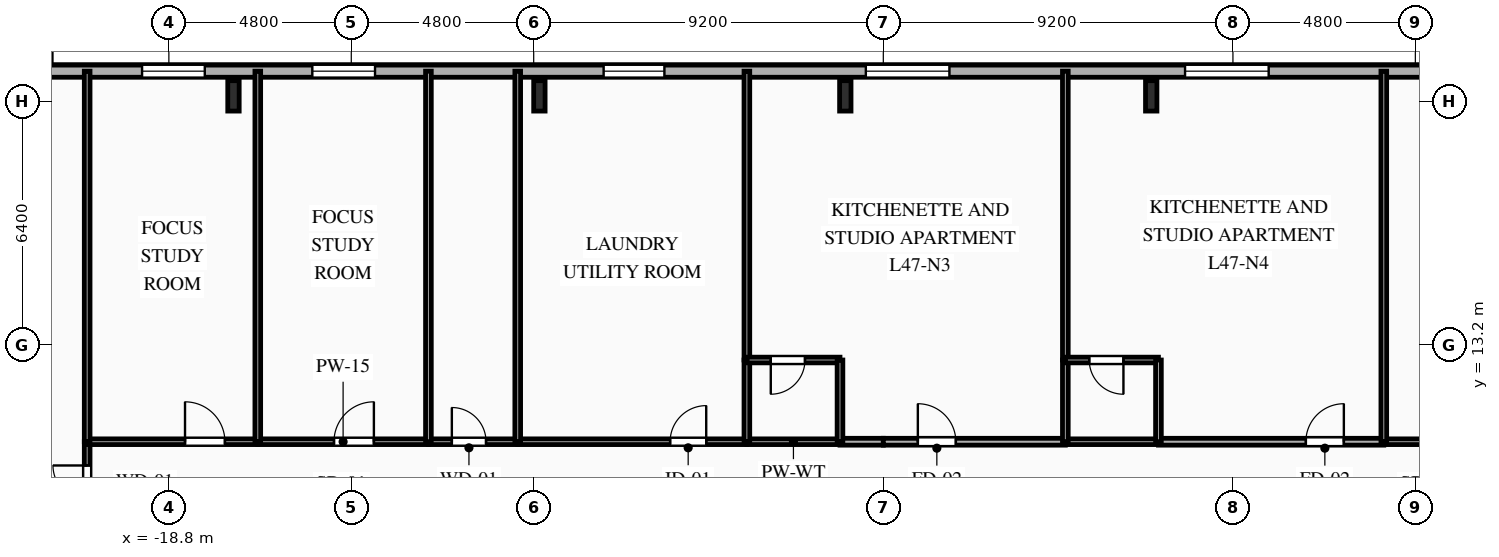
"""IFC4 building model, lengths in metres.
Left out: names, types, materials, properties, quantities, classifications, styles, units other than length and angle.
Written with IfcOpenShell. Run it as: python <this file> out.ifc"""

import sys

from ifc_helpers import new_model, si_unit, direction, frame, frame_2d, origin, origin_2d, place, context, subcontext, project, spatial, rectangle, i_section, extrude, element, fill, save


model = new_model("IFC4")
c1 = context("Model", 3, precision=1e-05, world=origin(), true_north=direction((0.0, 1.0)))
c2 = subcontext(c1, "Body", "Model", "MODEL_VIEW")
j1 = project(units=[si_unit("LENGTHUNIT", "METRE"), si_unit("PLANEANGLEUNIT", "RADIAN")], contexts=[c1])
p1 = place(None, origin())
s1 = spatial("IfcSite", under=j1, at=p1, CompositionType="ELEMENT")
p2 = place(p1, origin())
s2 = spatial("IfcBuilding", under=s1, at=p2, CompositionType="ELEMENT")
p3 = place(p2, frame((0.0, 0.0, 167.85)))
s3 = spatial("IfcBuildingStorey", under=s2, at=p3, CompositionType="ELEMENT", Elevation=167.85)
for number, where, z_axis, x_axis in (
    (1, (7.05, 19.75, 0.0), (0.0, 0.0, 1.0), (1.0, 0.0, 0.0)),
    (2, (-1.0, 19.75, 0.0), (0.0, 0.0, 1.0), (1.0, 0.0, 0.0)),
    (3, (-9.05, 19.75, 0.0), (0.0, 0.0, 1.0), (1.0, 0.0, 0.0)),
    (4, (-17.1, 19.75, 0.0), (0.0, 0.0, 1.0), (1.0, 0.0, 0.0)),
):
    element("IfcColumn", number, at=place(p3, frame(where, z_axis=z_axis, x_axis=x_axis)), inside=s3, PredefinedType="COLUMN", context=c2, shape_type="SweptSolid", body=[
        extrude(i_section(OverallWidth=0.3, OverallDepth=0.8, WebThickness=0.018, FlangeThickness=0.033, FilletRadius=0.03, at=origin_2d()), origin(), (0.0, 0.0, 1.0), 3.35),
    ])
p4 = place(p3, frame((-25.8, 20.4, 0.0), z_axis=(0.0, 0.0, 1.0), x_axis=(1.0, 0.0, 0.0)))
e5 = element("IfcWall", 5, at=p4, inside=s3, PredefinedType="SOLIDWALL", context=c2, shape_type="SweptSolid", body=[
    extrude(rectangle(XDim=49.6, YDim=0.32, at=frame_2d((24.8, 0.0))), origin(), (0.0, 0.0, 1.0), 3.04),
])
p5 = place(p4, frame((2.135, 0.0, 0.85)))
e6 = element("IfcOpeningElement", 6, at=p5, cuts=e5, PredefinedType="OPENING", context=c2, shape_type="SweptSolid", body=[
    extrude(rectangle(XDim=1.65, YDim=1.85, at=frame_2d((0.825, 0.925))), frame((0.0, 0.17, 0.0), z_axis=(0.0, -1.0, 0.0), x_axis=(1.0, 0.0, 0.0)), (0.0, 0.0, 1.0), 0.34),
])
p6 = place(p4, frame((6.295, 0.0, 0.85)))
e7 = element("IfcOpeningElement", 7, at=p6, cuts=e5, PredefinedType="OPENING", context=c2, shape_type="SweptSolid", body=[
    extrude(rectangle(XDim=1.65, YDim=1.85, at=frame_2d((0.825, 0.925))), frame((0.0, 0.17, 0.0), z_axis=(0.0, -1.0, 0.0), x_axis=(1.0, 0.0, 0.0)), (0.0, 0.0, 1.0), 0.34),
])
p7 = place(p4, frame((10.775, 0.0, 0.85)))
e8 = element("IfcOpeningElement", 8, at=p7, cuts=e5, PredefinedType="OPENING", context=c2, shape_type="SweptSolid", body=[
    extrude(rectangle(XDim=1.65, YDim=1.85, at=frame_2d((0.825, 0.925))), frame((0.0, 0.17, 0.0), z_axis=(0.0, -1.0, 0.0), x_axis=(1.0, 0.0, 0.0)), (0.0, 0.0, 1.0), 0.34),
])
p8 = place(p4, frame((18.44, 0.0, 0.85)))
e9 = element("IfcOpeningElement", 9, at=p8, cuts=e5, PredefinedType="OPENING", context=c2, shape_type="SweptSolid", body=[
    extrude(rectangle(XDim=1.6, YDim=1.85, at=frame_2d((0.8, 0.925))), frame((0.0, 0.17, 0.0), z_axis=(0.0, -1.0, 0.0), x_axis=(1.0, 0.0, 0.0)), (0.0, 0.0, 1.0), 0.34),
])
p9 = place(p4, frame((25.34, 0.0, 0.85)))
e10 = element("IfcOpeningElement", 10, at=p9, cuts=e5, PredefinedType="OPENING", context=c2, shape_type="SweptSolid", body=[
    extrude(rectangle(XDim=2.2, YDim=1.85, at=frame_2d((1.1, 0.925))), frame((0.0, 0.17, 0.0), z_axis=(0.0, -1.0, 0.0), x_axis=(1.0, 0.0, 0.0)), (0.0, 0.0, 1.0), 0.34),
])
p10 = place(p4, frame((33.74, 0.0, 0.85)))
e11 = element("IfcOpeningElement", 11, at=p10, cuts=e5, PredefinedType="OPENING", context=c2, shape_type="SweptSolid", body=[
    extrude(rectangle(XDim=2.2, YDim=1.85, at=frame_2d((1.1, 0.925))), frame((0.0, 0.17, 0.0), z_axis=(0.0, -1.0, 0.0), x_axis=(1.0, 0.0, 0.0)), (0.0, 0.0, 1.0), 0.34),
])
p11 = place(p4, frame((42.095, 0.0, 0.85)))
e12 = element("IfcOpeningElement", 12, at=p11, cuts=e5, PredefinedType="OPENING", context=c2, shape_type="SweptSolid", body=[
    extrude(rectangle(XDim=1.65, YDim=1.85, at=frame_2d((0.825, 0.925))), frame((0.0, 0.17, 0.0), z_axis=(0.0, -1.0, 0.0), x_axis=(1.0, 0.0, 0.0)), (0.0, 0.0, 1.0), 0.34),
])
p12 = place(p4, frame((47.45, 0.0, 0.85)))
e13 = element("IfcOpeningElement", 13, at=p12, cuts=e5, PredefinedType="OPENING", context=c2, shape_type="SweptSolid", body=[
    extrude(rectangle(XDim=1.1, YDim=1.85, at=frame_2d((0.55, 0.925))), frame((0.0, 0.17, 0.0), z_axis=(0.0, -1.0, 0.0), x_axis=(1.0, 0.0, 0.0)), (0.0, 0.0, 1.0), 0.34),
])
p13 = place(p3, frame((-20.95, 8.5, 0.0), z_axis=(0.0, 0.0, 1.0), x_axis=(0.0, 1.0, 0.0)))
e14 = element("IfcWall", 14, at=p13, inside=s3, PredefinedType="PARTITIONING", context=c2, shape_type="SweptSolid", body=[
    extrude(rectangle(XDim=2.15, YDim=0.15, at=frame_2d((1.075, 0.0))), origin(), (0.0, 0.0, 1.0), 3.04),
])
p14 = place(p13, frame((0.625, 0.0, 0.0)))
e15 = element("IfcOpeningElement", 15, at=p14, cuts=e14, PredefinedType="OPENING", context=c2, shape_type="SweptSolid", body=[
    extrude(rectangle(XDim=0.9, YDim=2.1, at=frame_2d((0.45, 1.05))), frame((0.0, 0.085, 0.0), z_axis=(0.0, -1.0, 0.0), x_axis=(1.0, 0.0, 0.0)), (0.0, 0.0, 1.0), 0.17),
])
p15 = place(p3, frame((-20.95, 10.65, 0.0), z_axis=(0.0, 0.0, 1.0), x_axis=(1.0, 0.0, 0.0)))
e16 = element("IfcWall", 16, at=p15, inside=s3, PredefinedType="PARTITIONING", context=c2, shape_type="SweptSolid", body=[
    extrude(rectangle(XDim=4.49, YDim=0.15, at=frame_2d((2.245, 0.0))), origin(), (0.0, 0.0, 1.0), 3.04),
])
p16 = place(p15, frame((2.575, 0.0, 0.0)))
e17 = element("IfcOpeningElement", 17, at=p16, cuts=e16, PredefinedType="OPENING", context=c2, shape_type="SweptSolid", body=[
    extrude(rectangle(XDim=1.05, YDim=2.15, at=frame_2d((0.525, 1.075))), frame((0.0, 0.085, 0.0), z_axis=(0.0, -1.0, 0.0), x_axis=(1.0, 0.0, 0.0)), (0.0, 0.0, 1.0), 0.17),
])
p17 = place(p3, frame((-16.46, 10.65, 0.0), z_axis=(0.0, 0.0, 1.0), x_axis=(1.0, 0.0, 0.0)))
e18 = element("IfcWall", 18, at=p17, inside=s3, PredefinedType="PARTITIONING", context=c2, shape_type="SweptSolid", body=[
    extrude(rectangle(XDim=4.49, YDim=0.15, at=frame_2d((2.245, 0.0))), origin(), (0.0, 0.0, 1.0), 3.04),
])
p18 = place(p17, frame((2.005, 0.0, 0.0)))
e19 = element("IfcOpeningElement", 19, at=p18, cuts=e18, PredefinedType="OPENING", context=c2, shape_type="SweptSolid", body=[
    extrude(rectangle(XDim=1.05, YDim=2.15, at=frame_2d((0.525, 1.075))), frame((0.0, 0.085, 0.0), z_axis=(0.0, -1.0, 0.0), x_axis=(1.0, 0.0, 0.0)), (0.0, 0.0, 1.0), 0.17),
])
p19 = place(p3, frame((-11.97, 10.65, 0.0), z_axis=(0.0, 0.0, 1.0), x_axis=(1.0, 0.0, 0.0)))
e20 = element("IfcWall", 20, at=p19, inside=s3, PredefinedType="PLUMBINGWALL", context=c2, shape_type="SweptSolid", body=[
    extrude(rectangle(XDim=2.35, YDim=0.15, at=frame_2d((1.175, 0.0))), origin(), (0.0, 0.0, 1.0), 3.04),
])
p20 = place(p19, frame((0.616, 0.0, 0.0)))
e21 = element("IfcOpeningElement", 21, at=p20, cuts=e20, PredefinedType="OPENING", context=c2, shape_type="SweptSolid", body=[
    extrude(rectangle(XDim=0.9, YDim=2.1, at=frame_2d((0.45, 1.05))), frame((0.0, 0.085, 0.0), z_axis=(0.0, -1.0, 0.0), x_axis=(1.0, 0.0, 0.0)), (0.0, 0.0, 1.0), 0.17),
])
p21 = place(p3, frame((-9.62, 10.65, 0.0), z_axis=(0.0, 0.0, 1.0), x_axis=(1.0, 0.0, 0.0)))
e22 = element("IfcWall", 22, at=p21, inside=s3, PredefinedType="PARTITIONING", context=c2, shape_type="SweptSolid", body=[
    extrude(rectangle(XDim=6.03, YDim=0.15, at=frame_2d((3.015, 0.0))), origin(), (0.0, 0.0, 1.0), 3.04),
])
p22 = place(p21, frame((4.01, 0.0, 0.0)))
e23 = element("IfcOpeningElement", 23, at=p22, cuts=e22, PredefinedType="OPENING", context=c2, shape_type="SweptSolid", body=[
    extrude(rectangle(XDim=0.95, YDim=2.1, at=frame_2d((0.475, 1.05))), frame((0.0, 0.085, 0.0), z_axis=(0.0, -1.0, 0.0), x_axis=(1.0, 0.0, 0.0)), (0.0, 0.0, 1.0), 0.17),
])
p23 = place(p3, frame((-1.14, 10.65, 0.0), z_axis=(0.0, 0.0, 1.0), x_axis=(1.0, 0.0, 0.0)))
e24 = element("IfcWall", 24, at=p23, inside=s3, PredefinedType="PARTITIONING", context=c2, shape_type="SweptSolid", body=[
    extrude(rectangle(XDim=1.14, YDim=0.18, at=frame_2d((0.57, 0.0))), origin(), (0.0, 0.0, 1.0), 3.04),
])
p24 = place(p3, frame((-3.59, 10.65, 0.0), z_axis=(0.0, 0.0, 1.0), x_axis=(1.0, 0.0, 0.0)))
e25 = element("IfcWall", 25, at=p24, inside=s3, PredefinedType="PLUMBINGWALL", context=c2, shape_type="SweptSolid", body=[
    extrude(rectangle(XDim=2.45, YDim=0.15, at=frame_2d((1.225, 0.0))), origin(), (0.0, 0.0, 1.0), 3.04),
])
p25 = place(p3, frame((0.0, 10.65, 0.0), z_axis=(0.0, 0.0, 1.0), x_axis=(1.0, 0.0, 0.0)))
e26 = element("IfcWall", 26, at=p25, inside=s3, PredefinedType="PARTITIONING", context=c2, shape_type="SweptSolid", body=[
    extrude(rectangle(XDim=4.79, YDim=0.18, at=frame_2d((2.395, 0.0))), origin(), (0.0, 0.0, 1.0), 3.04),
])
p26 = place(p25, frame((0.909, 0.0, 0.0)))
e27 = element("IfcOpeningElement", 27, at=p26, cuts=e26, PredefinedType="OPENING", context=c2, shape_type="SweptSolid", body=[
    extrude(rectangle(XDim=1.0, YDim=2.15, at=frame_2d((0.5, 1.075))), frame((0.0, 0.1, 0.0), z_axis=(0.0, -1.0, 0.0), x_axis=(1.0, 0.0, 0.0)), (0.0, 0.0, 1.0), 0.2),
])
p27 = place(p3, frame((7.24, 10.65, 0.0), z_axis=(0.0, 0.0, 1.0), x_axis=(1.0, 0.0, 0.0)))
e28 = element("IfcWall", 28, at=p27, inside=s3, PredefinedType="PARTITIONING", context=c2, shape_type="SweptSolid", body=[
    extrude(rectangle(XDim=5.93, YDim=0.18, at=frame_2d((2.965, 0.0))), origin(), (0.0, 0.0, 1.0), 3.04),
])
p28 = place(p27, frame((3.879, 0.0, 0.0)))
e29 = element("IfcOpeningElement", 29, at=p28, cuts=e28, PredefinedType="OPENING", context=c2, shape_type="SweptSolid", body=[
    extrude(rectangle(XDim=1.0, YDim=2.15, at=frame_2d((0.5, 1.075))), frame((0.0, 0.1, 0.0), z_axis=(0.0, -1.0, 0.0), x_axis=(1.0, 0.0, 0.0)), (0.0, 0.0, 1.0), 0.2),
])
p29 = place(p3, frame((4.79, 10.65, 0.0), z_axis=(0.0, 0.0, 1.0), x_axis=(1.0, 0.0, 0.0)))
e30 = element("IfcWall", 30, at=p29, inside=s3, PredefinedType="PLUMBINGWALL", context=c2, shape_type="SweptSolid", body=[
    extrude(rectangle(XDim=2.45, YDim=0.15, at=frame_2d((1.225, 0.0))), origin(), (0.0, 0.0, 1.0), 3.04),
])
p30 = place(p3, frame((13.17, 10.65, 0.0), z_axis=(0.0, 0.0, 1.0), x_axis=(1.0, 0.0, 0.0)))
e31 = element("IfcWall", 31, at=p30, inside=s3, PredefinedType="PARTITIONING", context=c2, shape_type="SweptSolid", body=[
    extrude(rectangle(XDim=7.78, YDim=0.15, at=frame_2d((3.89, 0.0))), origin(), (0.0, 0.0, 1.0), 3.04),
])
p31 = place(p30, frame((1.276, 0.0, 0.0)))
e32 = element("IfcOpeningElement", 32, at=p31, cuts=e31, PredefinedType="OPENING", context=c2, shape_type="SweptSolid", body=[
    extrude(rectangle(XDim=1.05, YDim=2.15, at=frame_2d((0.525, 1.075))), frame((0.0, 0.085, 0.0), z_axis=(0.0, -1.0, 0.0), x_axis=(1.0, 0.0, 0.0)), (0.0, 0.0, 1.0), 0.17),
])
for number, where, z_axis, x_axis in (
    (33, (-20.95, 20.4, 0.0), (0.0, 0.0, 1.0), (0.0, -1.0, 0.0)),
    (34, (-16.46, 20.4, 0.0), (0.0, 0.0, 1.0), (0.0, -1.0, 0.0)),
):
    element("IfcWall", number, at=place(p3, frame(where, z_axis=z_axis, x_axis=x_axis)), inside=s3, PredefinedType="PARTITIONING", context=c2, shape_type="SweptSolid", body=[
        extrude(rectangle(XDim=9.75, YDim=0.15, at=frame_2d((4.875, 0.0))), origin(), (0.0, 0.0, 1.0), 3.04),
    ])
for number, where, z_axis, x_axis in (
    (35, (-11.97, 20.4, 0.0), (0.0, 0.0, 1.0), (0.0, -1.0, 0.0)),
    (36, (-9.62, 20.4, 0.0), (0.0, 0.0, 1.0), (0.0, -1.0, 0.0)),
):
    element("IfcWall", number, at=place(p3, frame(where, z_axis=z_axis, x_axis=x_axis)), inside=s3, PredefinedType="PLUMBINGWALL", context=c2, shape_type="SweptSolid", body=[
        extrude(rectangle(XDim=9.75, YDim=0.15, at=frame_2d((4.875, 0.0))), origin(), (0.0, 0.0, 1.0), 3.04),
    ])
p32 = place(p3, frame((-3.59, 20.4, 0.0), z_axis=(0.0, 0.0, 1.0), x_axis=(0.0, -1.0, 0.0)))
e37 = element("IfcWall", 37, at=p32, inside=s3, PredefinedType="PARTITIONING", context=c2, shape_type="SweptSolid", body=[
    extrude(rectangle(XDim=7.6, YDim=0.15, at=frame_2d((3.8, 0.0))), origin(), (0.0, 0.0, 1.0), 3.04),
])
p33 = place(p3, frame((-3.59, 12.8, 0.0), z_axis=(0.0, 0.0, 1.0), x_axis=(0.0, -1.0, 0.0)))
e38 = element("IfcWall", 38, at=p33, inside=s3, PredefinedType="PLUMBINGWALL", context=c2, shape_type="SweptSolid", body=[
    extrude(rectangle(XDim=2.15, YDim=0.15, at=frame_2d((1.075, 0.0))), origin(), (0.0, 0.0, 1.0), 3.04),
])
p34 = place(p3, frame((-1.14, 12.8, 0.0), z_axis=(0.0, 0.0, 1.0), x_axis=(-1.0, 0.0, 0.0)))
e39 = element("IfcWall", 39, at=p34, inside=s3, PredefinedType="PLUMBINGWALL", context=c2, shape_type="SweptSolid", body=[
    extrude(rectangle(XDim=2.45, YDim=0.15, at=frame_2d((1.225, 0.0))), origin(), (0.0, 0.0, 1.0), 3.04),
])
p35 = place(p34, frame((0.921, 0.0, 0.0)))
e40 = element("IfcOpeningElement", 40, at=p35, cuts=e39, PredefinedType="OPENING", context=c2, shape_type="SweptSolid", body=[
    extrude(rectangle(XDim=0.9, YDim=2.1, at=frame_2d((0.45, 1.05))), frame((0.0, 0.085, 0.0), z_axis=(0.0, -1.0, 0.0), x_axis=(1.0, 0.0, 0.0)), (0.0, 0.0, 1.0), 0.17),
])
p36 = place(p3, frame((-1.14, 10.65, 0.0), z_axis=(0.0, 0.0, 1.0), x_axis=(0.0, 1.0, 0.0)))
e41 = element("IfcWall", 41, at=p36, inside=s3, PredefinedType="PLUMBINGWALL", context=c2, shape_type="SweptSolid", body=[
    extrude(rectangle(XDim=2.15, YDim=0.15, at=frame_2d((1.075, 0.0))), origin(), (0.0, 0.0, 1.0), 3.04),
])
p37 = place(p3, frame((4.79, 20.4, 0.0), z_axis=(0.0, 0.0, 1.0), x_axis=(0.0, -1.0, 0.0)))
e42 = element("IfcWall", 42, at=p37, inside=s3, PredefinedType="PARTITIONING", context=c2, shape_type="SweptSolid", body=[
    extrude(rectangle(XDim=7.6, YDim=0.15, at=frame_2d((3.8, 0.0))), origin(), (0.0, 0.0, 1.0), 3.04),
])
p38 = place(p3, frame((4.79, 12.8, 0.0), z_axis=(0.0, 0.0, 1.0), x_axis=(0.0, -1.0, 0.0)))
e43 = element("IfcWall", 43, at=p38, inside=s3, PredefinedType="PLUMBINGWALL", context=c2, shape_type="SweptSolid", body=[
    extrude(rectangle(XDim=2.15, YDim=0.15, at=frame_2d((1.075, 0.0))), origin(), (0.0, 0.0, 1.0), 3.04),
])
p39 = place(p3, frame((7.24, 12.8, 0.0), z_axis=(0.0, 0.0, 1.0), x_axis=(-1.0, 0.0, 0.0)))
e44 = element("IfcWall", 44, at=p39, inside=s3, PredefinedType="PLUMBINGWALL", context=c2, shape_type="SweptSolid", body=[
    extrude(rectangle(XDim=2.45, YDim=0.15, at=frame_2d((1.225, 0.0))), origin(), (0.0, 0.0, 1.0), 3.04),
])
p40 = place(p39, frame((0.921, 0.0, 0.0)))
e45 = element("IfcOpeningElement", 45, at=p40, cuts=e44, PredefinedType="OPENING", context=c2, shape_type="SweptSolid", body=[
    extrude(rectangle(XDim=0.9, YDim=2.1, at=frame_2d((0.45, 1.05))), frame((0.0, 0.085, 0.0), z_axis=(0.0, -1.0, 0.0), x_axis=(1.0, 0.0, 0.0)), (0.0, 0.0, 1.0), 0.17),
])
p41 = place(p3, frame((7.24, 10.65, 0.0), z_axis=(0.0, 0.0, 1.0), x_axis=(0.0, 1.0, 0.0)))
e46 = element("IfcWall", 46, at=p41, inside=s3, PredefinedType="PLUMBINGWALL", context=c2, shape_type="SweptSolid", body=[
    extrude(rectangle(XDim=2.15, YDim=0.15, at=frame_2d((1.075, 0.0))), origin(), (0.0, 0.0, 1.0), 3.04),
])
p42 = place(p3, frame((13.17, 20.4, 0.0), z_axis=(0.0, 0.0, 1.0), x_axis=(0.0, -1.0, 0.0)))
e47 = element("IfcWall", 47, at=p42, inside=s3, PredefinedType="PARTITIONING", context=c2, shape_type="SweptSolid", body=[
    extrude(rectangle(XDim=9.75, YDim=0.15, at=frame_2d((4.875, 0.0))), origin(), (0.0, 0.0, 1.0), 3.04),
])
p43 = place(p6, origin())
e48 = element("IfcWindow", 48, at=p43, inside=s3, PartitioningType="SINGLE_PANEL", PredefinedType="WINDOW", context=c2, shape_type="SweptSolid", body=[
    extrude(rectangle(XDim=1.65, YDim=1.85, at=frame_2d((0.825, 0.925))), frame((0.0, 0.03, 0.0), z_axis=(0.0, -1.0, 0.0), x_axis=(1.0, 0.0, 0.0)), (0.0, 0.0, 1.0), 0.06),
])
fill(e7, e48)
p44 = place(p7, origin())
e49 = element("IfcWindow", 49, at=p44, inside=s3, PartitioningType="SINGLE_PANEL", PredefinedType="WINDOW", context=c2, shape_type="SweptSolid", body=[
    extrude(rectangle(XDim=1.65, YDim=1.85, at=frame_2d((0.825, 0.925))), frame((0.0, 0.03, 0.0), z_axis=(0.0, -1.0, 0.0), x_axis=(1.0, 0.0, 0.0)), (0.0, 0.0, 1.0), 0.06),
])
fill(e8, e49)
p45 = place(p8, origin())
e50 = element("IfcWindow", 50, at=p45, inside=s3, PartitioningType="SINGLE_PANEL", PredefinedType="WINDOW", context=c2, shape_type="SweptSolid", body=[
    extrude(rectangle(XDim=1.6, YDim=1.85, at=frame_2d((0.8, 0.925))), frame((0.0, 0.03, 0.0), z_axis=(0.0, -1.0, 0.0), x_axis=(1.0, 0.0, 0.0)), (0.0, 0.0, 1.0), 0.06),
])
fill(e9, e50)
p46 = place(p9, origin())
e51 = element("IfcWindow", 51, at=p46, inside=s3, PartitioningType="SINGLE_PANEL", PredefinedType="WINDOW", context=c2, shape_type="SweptSolid", body=[
    extrude(rectangle(XDim=2.2, YDim=1.85, at=frame_2d((1.1, 0.925))), frame((0.0, 0.03, 0.0), z_axis=(0.0, -1.0, 0.0), x_axis=(1.0, 0.0, 0.0)), (0.0, 0.0, 1.0), 0.06),
])
fill(e10, e51)
p47 = place(p10, origin())
e52 = element("IfcWindow", 52, at=p47, inside=s3, PartitioningType="SINGLE_PANEL", PredefinedType="WINDOW", context=c2, shape_type="SweptSolid", body=[
    extrude(rectangle(XDim=2.2, YDim=1.85, at=frame_2d((1.1, 0.925))), frame((0.0, 0.03, 0.0), z_axis=(0.0, -1.0, 0.0), x_axis=(1.0, 0.0, 0.0)), (0.0, 0.0, 1.0), 0.06),
])
fill(e11, e52)
p48 = place(p14, origin())
e53 = element("IfcDoor", 53, at=p48, inside=s3, OperationType="SINGLE_SWING_RIGHT", PredefinedType="DOOR", context=c2, shape_type="SweptSolid", body=[
    extrude(rectangle(XDim=0.9, YDim=2.1, at=frame_2d((0.45, 1.05))), frame((0.0, 0.025, 0.0), z_axis=(0.0, -1.0, 0.0), x_axis=(1.0, 0.0, 0.0)), (0.0, 0.0, 1.0), 0.05),
])
fill(e15, e53)
p49 = place(p16, origin())
e54 = element("IfcDoor", 54, at=p49, inside=s3, OperationType="SINGLE_SWING_LEFT", PredefinedType="DOOR", context=c2, shape_type="SweptSolid", body=[
    extrude(rectangle(XDim=1.05, YDim=2.15, at=frame_2d((0.525, 1.075))), frame((0.0, 0.025, 0.0), z_axis=(0.0, -1.0, 0.0), x_axis=(1.0, 0.0, 0.0)), (0.0, 0.0, 1.0), 0.05),
])
fill(e17, e54)
p50 = place(p18, origin())
e55 = element("IfcDoor", 55, at=p50, inside=s3, OperationType="SINGLE_SWING_RIGHT", PredefinedType="DOOR", context=c2, shape_type="SweptSolid", body=[
    extrude(rectangle(XDim=1.05, YDim=2.15, at=frame_2d((0.525, 1.075))), frame((0.0, 0.025, 0.0), z_axis=(0.0, -1.0, 0.0), x_axis=(1.0, 0.0, 0.0)), (0.0, 0.0, 1.0), 0.05),
])
fill(e19, e55)
p51 = place(p20, origin())
e56 = element("IfcDoor", 56, at=p51, inside=s3, OperationType="SINGLE_SWING_LEFT", PredefinedType="DOOR", context=c2, shape_type="SweptSolid", body=[
    extrude(rectangle(XDim=0.9, YDim=2.1, at=frame_2d((0.45, 1.05))), frame((0.0, 0.025, 0.0), z_axis=(0.0, -1.0, 0.0), x_axis=(1.0, 0.0, 0.0)), (0.0, 0.0, 1.0), 0.05),
])
fill(e21, e56)
p52 = place(p22, origin())
e57 = element("IfcDoor", 57, at=p52, inside=s3, OperationType="SINGLE_SWING_RIGHT", PredefinedType="DOOR", context=c2, shape_type="SweptSolid", body=[
    extrude(rectangle(XDim=0.95, YDim=2.1, at=frame_2d((0.475, 1.05))), frame((0.0, 0.025, 0.0), z_axis=(0.0, -1.0, 0.0), x_axis=(1.0, 0.0, 0.0)), (0.0, 0.0, 1.0), 0.05),
])
fill(e23, e57)
p53 = place(p26, origin())
e58 = element("IfcDoor", 58, at=p53, inside=s3, OperationType="SINGLE_SWING_LEFT", PredefinedType="DOOR", context=c2, shape_type="SweptSolid", body=[
    extrude(rectangle(XDim=1.0, YDim=2.15, at=frame_2d((0.5, 1.075))), frame((0.0, 0.025, 0.0), z_axis=(0.0, -1.0, 0.0), x_axis=(1.0, 0.0, 0.0)), (0.0, 0.0, 1.0), 0.05),
])
fill(e27, e58)
p54 = place(p28, origin())
e59 = element("IfcDoor", 59, at=p54, inside=s3, OperationType="SINGLE_SWING_RIGHT", PredefinedType="DOOR", context=c2, shape_type="SweptSolid", body=[
    extrude(rectangle(XDim=1.0, YDim=2.15, at=frame_2d((0.5, 1.075))), frame((0.0, 0.025, 0.0), z_axis=(0.0, -1.0, 0.0), x_axis=(1.0, 0.0, 0.0)), (0.0, 0.0, 1.0), 0.05),
])
fill(e29, e59)
p55 = place(p35, origin())
e60 = element("IfcDoor", 60, at=p55, inside=s3, OperationType="SINGLE_SWING_RIGHT", PredefinedType="DOOR", context=c2, shape_type="SweptSolid", body=[
    extrude(rectangle(XDim=0.9, YDim=2.1, at=frame_2d((0.45, 1.05))), frame((0.0, 0.025, 0.0), z_axis=(0.0, -1.0, 0.0), x_axis=(1.0, 0.0, 0.0)), (0.0, 0.0, 1.0), 0.05),
])
fill(e40, e60)
p56 = place(p40, origin())
e61 = element("IfcDoor", 61, at=p56, inside=s3, OperationType="SINGLE_SWING_LEFT", PredefinedType="DOOR", context=c2, shape_type="SweptSolid", body=[
    extrude(rectangle(XDim=0.9, YDim=2.1, at=frame_2d((0.45, 1.05))), frame((0.0, 0.025, 0.0), z_axis=(0.0, -1.0, 0.0), x_axis=(1.0, 0.0, 0.0)), (0.0, 0.0, 1.0), 0.05),
])
fill(e45, e61)
save(model, sys.argv[1])
